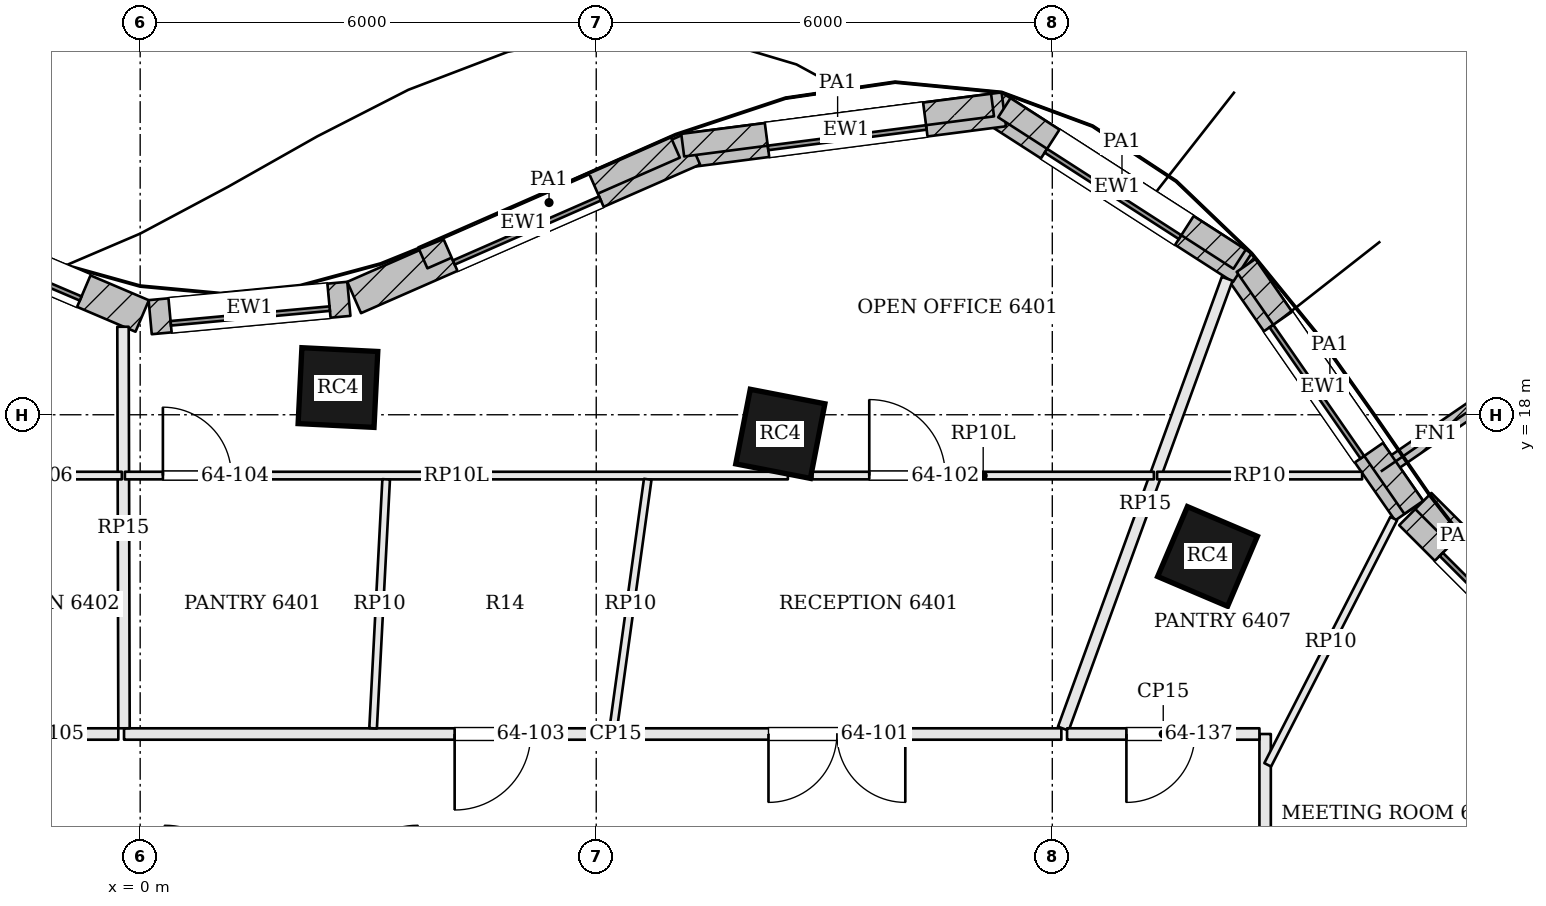
"""IFC4 building model, lengths in metres.
Left out: names, types, materials, properties, quantities, classifications, styles, units other than length and angle.
Written with IfcOpenShell. Run it as: python <this file> out.ifc"""

import sys

from ifc_helpers import new_model, si_unit, direction, frame, frame_2d, origin, origin_2d, place, context, subcontext, project, spatial, rectangle, extrude, element, fill, save


model = new_model("IFC4")
c1 = context("Model", 3, precision=1e-05, world=origin(), true_north=direction((0.0, 1.0)))
c2 = subcontext(c1, "Body", "Model", "MODEL_VIEW")
j1 = project(units=[si_unit("LENGTHUNIT", "METRE"), si_unit("PLANEANGLEUNIT", "RADIAN")], contexts=[c1])
p1 = place(None, origin())
s1 = spatial("IfcSite", under=j1, at=p1, CompositionType="ELEMENT")
p2 = place(p1, origin())
s2 = spatial("IfcBuilding", under=s1, at=p2, CompositionType="ELEMENT")
p3 = place(p2, frame((0.0, 0.0, 260.4)))
s3 = spatial("IfcBuildingStorey", under=s2, at=p3, CompositionType="ELEMENT", Elevation=260.4)
for number, where, z_axis, x_axis in (
    (1, (14.042, 16.136, 0.0), (0.0, 0.0, 1.0), (-0.92, 0.392, 0.0)),
    (2, (8.422, 17.749, 0.0), (0.0, 0.0, 1.0), (-0.982, 0.191, 0.0)),
    (3, (2.602, 18.358, 0.0), (0.0, 0.0, 1.0), (-0.999, 0.05, 0.0)),
):
    element("IfcColumn", number, at=place(p3, frame(where, z_axis=z_axis, x_axis=x_axis)), inside=s3, PredefinedType="COLUMN", context=c2, shape_type="SweptSolid", body=[
        extrude(rectangle(XDim=1.0, YDim=1.0, at=origin_2d()), origin(), (0.0, 0.0, 1.0), 3.1),
    ])
p4 = place(p3, frame((19.145, 14.285, 0.0), z_axis=(0.0, 0.0, 1.0), x_axis=(-0.707427521052, 0.706785895769, 0.0)))
e4 = element("IfcWall", 4, at=p4, inside=s3, PredefinedType="SOLIDWALL", context=c2, shape_type="SweptSolid", body=[
    extrude(rectangle(XDim=3.425, YDim=0.45, at=frame_2d((1.712, 0.0))), origin(), (0.0, 0.0, 1.0), 3.6),
])
p5 = place(p4, frame((0.662, 0.0, 0.9)))
e5 = element("IfcOpeningElement", 5, at=p5, cuts=e4, PredefinedType="OPENING", context=c2, shape_type="SweptSolid", body=[
    extrude(rectangle(XDim=2.1, YDim=1.8, at=frame_2d((1.05, 0.9))), frame((0.0, 0.235, 0.0), z_axis=(0.0, -1.0, 0.0), x_axis=(1.0, 0.0, 0.0)), (0.0, 0.0, 1.0), 0.47),
])
p6 = place(p3, frame((16.695, 16.737, 0.0), z_axis=(0.0, 0.0, 1.0), x_axis=(-0.569652445465, 0.821885692402, 0.0)))
e6 = element("IfcWall", 6, at=p6, inside=s3, PredefinedType="SOLIDWALL", context=c2, shape_type="SweptSolid", body=[
    extrude(rectangle(XDim=3.959, YDim=0.45, at=frame_2d((1.979, 0.0))), origin(), (0.0, 0.0, 1.0), 3.6),
])
p7 = place(p6, frame((0.929, 0.0, 0.9)))
e7 = element("IfcOpeningElement", 7, at=p7, cuts=e6, PredefinedType="OPENING", context=c2, shape_type="SweptSolid", body=[
    extrude(rectangle(XDim=2.1, YDim=1.8, at=frame_2d((1.05, 0.9))), frame((0.0, 0.235, 0.0), z_axis=(0.0, -1.0, 0.0), x_axis=(1.0, 0.0, 0.0)), (0.0, 0.0, 1.0), 0.47),
])
p8 = place(p3, frame((14.499, 19.935, 0.0), z_axis=(0.0, 0.0, 1.0), x_axis=(-0.84080910763, 0.541331732422, 0.0)))
e8 = element("IfcWall", 8, at=p8, inside=s3, PredefinedType="SOLIDWALL", context=c2, shape_type="SweptSolid", body=[
    extrude(rectangle(XDim=3.911, YDim=0.45, at=frame_2d((1.955, 0.0))), origin(), (0.0, 0.0, 1.0), 3.6),
])
p9 = place(p8, frame((0.905, 0.0, 0.9)))
e9 = element("IfcOpeningElement", 9, at=p9, cuts=e8, PredefinedType="OPENING", context=c2, shape_type="SweptSolid", body=[
    extrude(rectangle(XDim=2.1, YDim=1.8, at=frame_2d((1.05, 0.9))), frame((0.0, 0.235, 0.0), z_axis=(0.0, -1.0, 0.0), x_axis=(1.0, 0.0, 0.0)), (0.0, 0.0, 1.0), 0.47),
])
p10 = place(p3, frame((11.362, 22.018, 0.0), z_axis=(0.0, 0.0, 1.0), x_axis=(-0.991724958022, -0.128380713645, 0.0)))
e10 = element("IfcWall", 10, at=p10, inside=s3, PredefinedType="SOLIDWALL", context=c2, shape_type="SweptSolid", body=[
    extrude(rectangle(XDim=4.182, YDim=0.45, at=frame_2d((2.091, 0.0))), origin(), (0.0, 0.0, 1.0), 3.6),
])
p11 = place(p10, frame((1.041, 0.0, 0.9)))
e11 = element("IfcOpeningElement", 11, at=p11, cuts=e10, PredefinedType="OPENING", context=c2, shape_type="SweptSolid", body=[
    extrude(rectangle(XDim=2.1, YDim=1.8, at=frame_2d((1.05, 0.9))), frame((0.0, 0.235, 0.0), z_axis=(0.0, -1.0, 0.0), x_axis=(1.0, 0.0, 0.0)), (0.0, 0.0, 1.0), 0.47),
])
p12 = place(p3, frame((7.276, 21.498, 0.0), z_axis=(0.0, 0.0, 1.0), x_axis=(-0.915872941312, -0.401468249519, 0.0)))
e12 = element("IfcWall", 12, at=p12, inside=s3, PredefinedType="SOLIDWALL", context=c2, shape_type="SweptSolid", body=[
    extrude(rectangle(XDim=4.87, YDim=0.45, at=frame_2d((2.435, 0.0))), origin(), (0.0, 0.0, 1.0), 3.6),
])
p13 = place(p12, frame((1.385, 0.0, 0.9)))
e13 = element("IfcOpeningElement", 13, at=p13, cuts=e12, PredefinedType="OPENING", context=c2, shape_type="SweptSolid", body=[
    extrude(rectangle(XDim=2.1, YDim=1.8, at=frame_2d((1.05, 0.9))), frame((0.0, 0.235, 0.0), z_axis=(0.0, -1.0, 0.0), x_axis=(1.0, 0.0, 0.0)), (0.0, 0.0, 1.0), 0.47),
])
p14 = place(p3, frame((2.745, 19.525, 0.0), z_axis=(0.0, 0.0, 1.0), x_axis=(-0.995768774275, -0.091894222771, 0.0)))
e14 = element("IfcWall", 14, at=p14, inside=s3, PredefinedType="SOLIDWALL", context=c2, shape_type="SweptSolid", body=[
    extrude(rectangle(XDim=2.625, YDim=0.45, at=frame_2d((1.312, 0.0))), origin(), (0.0, 0.0, 1.0), 3.6),
])
p15 = place(p14, frame((0.262, 0.0, 0.9)))
e15 = element("IfcOpeningElement", 15, at=p15, cuts=e14, PredefinedType="OPENING", context=c2, shape_type="SweptSolid", body=[
    extrude(rectangle(XDim=2.1, YDim=1.8, at=frame_2d((1.05, 0.9))), frame((0.0, 0.235, 0.0), z_axis=(0.0, -1.0, 0.0), x_axis=(1.0, 0.0, 0.0)), (0.0, 0.0, 1.0), 0.47),
])
p16 = place(p3, frame((0.026, 19.299, 0.0), z_axis=(0.0, 0.0, 1.0), x_axis=(-0.920040408927, 0.391823488245, 0.0)))
e16 = element("IfcWall", 16, at=p16, inside=s3, PredefinedType="SOLIDWALL", context=c2, shape_type="SweptSolid", body=[
    extrude(rectangle(XDim=3.77, YDim=0.45, at=frame_2d((1.885, 0.0))), origin(), (0.0, 0.0, 1.0), 3.6),
])
p17 = place(p16, frame((0.835, 0.0, 0.9)))
e17 = element("IfcOpeningElement", 17, at=p17, cuts=e16, PredefinedType="OPENING", context=c2, shape_type="SweptSolid", body=[
    extrude(rectangle(XDim=2.1, YDim=1.8, at=frame_2d((1.05, 0.9))), frame((0.0, 0.235, 0.0), z_axis=(0.0, -1.0, 0.0), x_axis=(1.0, 0.0, 0.0)), (0.0, 0.0, 1.0), 0.47),
])
p18 = place(p3, frame((16.322, 17.253, 0.0), z_axis=(0.0, 0.0, 1.0), x_axis=(0.824440606412, 0.565948483962, 0.0)))
e18 = element("IfcWall", 18, at=p18, inside=s3, PredefinedType="SOLIDWALL", context=c2, shape_type="SweptSolid", body=[
    extrude(rectangle(XDim=1.75, YDim=0.2, at=frame_2d((0.875, 0.0))), origin(), (0.0, 0.0, 1.0), 3.6),
])
p19 = place(p3, frame((17.811, 15.936, 3.9), z_axis=(0.0, 0.0, 1.0), x_axis=(-0.707385370732, 0.706828081837, 0.0)))
e19 = element("IfcWall", 19, at=p19, inside=s3, PredefinedType="PARAPET", context=c2, shape_type="SweptSolid", body=[
    extrude(rectangle(XDim=1.314, YDim=0.3, at=frame_2d((0.657, 0.0))), origin(), (0.0, 0.0, 1.0), 1.1),
])
p20 = place(p3, frame((16.755, 16.781, 3.9), z_axis=(0.0, 0.0, 1.0), x_axis=(-0.569678588486, 0.821867571948, 0.0)))
e20 = element("IfcWall", 20, at=p20, inside=s3, PredefinedType="PARAPET", context=c2, shape_type="SweptSolid", body=[
    extrude(rectangle(XDim=3.873, YDim=0.3, at=frame_2d((1.937, 0.0))), origin(), (0.0, 0.0, 1.0), 1.1),
])
p21 = place(p3, frame((14.465, 20.046, 3.9), z_axis=(0.0, 0.0, 1.0), x_axis=(-0.840809836002, 0.541330601095, 0.0)))
e21 = element("IfcWall", 21, at=p21, inside=s3, PredefinedType="PARAPET", context=c2, shape_type="SweptSolid", body=[
    extrude(rectangle(XDim=3.682, YDim=0.3, at=frame_2d((1.841, 0.0))), origin(), (0.0, 0.0, 1.0), 1.1),
])
p22 = place(p3, frame((11.214, 22.074, 3.9), z_axis=(0.0, 0.0, 1.0), x_axis=(-0.991727449614, -0.128361464939, 0.0)))
e22 = element("IfcWall", 22, at=p22, inside=s3, PredefinedType="PARAPET", context=c2, shape_type="SweptSolid", body=[
    extrude(rectangle(XDim=4.11, YDim=0.3, at=frame_2d((2.055, 0.0))), origin(), (0.0, 0.0, 1.0), 1.1),
])
p23 = place(p3, frame((7.039, 21.519, 3.9), z_axis=(0.0, 0.0, 1.0), x_axis=(-0.915895948183, -0.401415759659, 0.0)))
e23 = element("IfcWall", 23, at=p23, inside=s3, PredefinedType="PARAPET", context=c2, shape_type="SweptSolid", body=[
    extrude(rectangle(XDim=3.625, YDim=0.3, at=frame_2d((1.813, 0.0))), origin(), (0.0, 0.0, 1.0), 1.1),
])
p24 = place(p3, frame((12.119, 13.8, 0.0), z_axis=(0.0, 0.0, 1.0), x_axis=(-1.0, 0.0, 0.0)))
e24 = element("IfcWall", 24, at=p24, inside=s3, PredefinedType="PARTITIONING", context=c2, shape_type="SweptSolid", body=[
    extrude(rectangle(XDim=12.332, YDim=0.15, at=frame_2d((6.166, 0.0))), origin(), (0.0, 0.0, 1.0), 2.984),
])
p25 = place(p24, frame((2.053, 0.0, 0.0)))
e25 = element("IfcOpeningElement", 25, at=p25, cuts=e24, PredefinedType="OPENING", context=c2, shape_type="SweptSolid", body=[
    extrude(rectangle(XDim=1.8, YDim=2.1, at=frame_2d((0.9, 1.05))), frame((0.0, 0.085, 0.0), z_axis=(0.0, -1.0, 0.0), x_axis=(1.0, 0.0, 0.0)), (0.0, 0.0, 1.0), 0.17),
])
p26 = place(p24, frame((6.982, 0.0, 0.0)))
e26 = element("IfcOpeningElement", 26, at=p26, cuts=e24, PredefinedType="OPENING", context=c2, shape_type="SweptSolid", body=[
    extrude(rectangle(XDim=1.0, YDim=2.4, at=frame_2d((0.5, 1.2))), frame((0.0, 0.085, 0.0), z_axis=(0.0, -1.0, 0.0), x_axis=(1.0, 0.0, 0.0)), (0.0, 0.0, 1.0), 0.17),
])
p27 = place(p3, frame((14.301, 19.789, 0.0), z_axis=(0.0, 0.0, 1.0), x_axis=(-0.342247171487, -0.939609958232, 0.0)))
e27 = element("IfcWall", 27, at=p27, inside=s3, PredefinedType="PARTITIONING", context=c2, shape_type="SweptSolid", body=[
    extrude(rectangle(XDim=6.299, YDim=0.15, at=frame_2d((3.149, 0.0))), origin(), (0.0, 0.0, 1.0), 2.984),
])
p28 = place(p3, frame((-0.226, 19.158, 0.0), z_axis=(0.0, 0.0, 1.0), x_axis=(0.002541816357, -0.99999676958, 0.0)))
e28 = element("IfcWall", 28, at=p28, inside=s3, PredefinedType="PARTITIONING", context=c2, shape_type="SweptSolid", body=[
    extrude(rectangle(XDim=5.283, YDim=0.15, at=frame_2d((2.641, 0.0))), origin(), (0.0, 0.0, 1.0), 2.984),
])
p29 = place(p3, frame((-0.288, 13.8, 0.0), z_axis=(0.0, 0.0, 1.0), x_axis=(-1.0, 0.0, 0.0)))
e29 = element("IfcWall", 29, at=p29, inside=s3, PredefinedType="PARTITIONING", context=c2, shape_type="SweptSolid", body=[
    extrude(rectangle(XDim=11.549, YDim=0.15, at=frame_2d((5.775, 0.0))), origin(), (0.0, 0.0, 1.0), 2.984),
])
p30 = place(p29, frame((0.899, 0.0, 0.0)))
e30 = element("IfcOpeningElement", 30, at=p30, cuts=e29, PredefinedType="OPENING", context=c2, shape_type="SweptSolid", body=[
    extrude(rectangle(XDim=1.0, YDim=2.1, at=frame_2d((0.5, 1.05))), frame((0.0, 0.085, 0.0), z_axis=(0.0, -1.0, 0.0), x_axis=(1.0, 0.0, 0.0)), (0.0, 0.0, 1.0), 0.17),
])
p31 = place(p29, frame((3.915, 0.0, 0.0)))
e31 = element("IfcOpeningElement", 31, at=p31, cuts=e29, PredefinedType="OPENING", context=c2, shape_type="SweptSolid", body=[
    extrude(rectangle(XDim=1.0, YDim=2.4, at=frame_2d((0.5, 1.2))), frame((0.0, 0.085, 0.0), z_axis=(0.0, -1.0, 0.0), x_axis=(1.0, 0.0, 0.0)), (0.0, 0.0, 1.0), 0.17),
])
p32 = place(p3, frame((14.8, 2.318, 0.0), z_axis=(0.0, 0.0, 1.0), x_axis=(0.0, 1.0, 0.0)))
e32 = element("IfcWall", 32, at=p32, inside=s3, PredefinedType="PARTITIONING", context=c2, shape_type="SweptSolid", body=[
    extrude(rectangle(XDim=11.482, YDim=0.15, at=frame_2d((5.741, 0.0))), origin(), (0.0, 0.0, 1.0), 2.984),
])
p33 = place(p32, frame((1.806, 0.0, 0.0)))
e33 = element("IfcOpeningElement", 33, at=p33, cuts=e32, PredefinedType="OPENING", context=c2, shape_type="SweptSolid", body=[
    extrude(rectangle(XDim=1.8, YDim=2.1, at=frame_2d((0.9, 1.05))), frame((0.0, 0.085, 0.0), z_axis=(0.0, -1.0, 0.0), x_axis=(1.0, 0.0, 0.0)), (0.0, 0.0, 1.0), 0.17),
])
p34 = place(p32, frame((7.748, 0.0, 0.0)))
e34 = element("IfcOpeningElement", 34, at=p34, cuts=e32, PredefinedType="OPENING", context=c2, shape_type="SweptSolid", body=[
    extrude(rectangle(XDim=1.0, YDim=2.4, at=frame_2d((0.5, 1.2))), frame((0.0, 0.085, 0.0), z_axis=(0.0, -1.0, 0.0), x_axis=(1.0, 0.0, 0.0)), (0.0, 0.0, 1.0), 0.17),
])
p35 = place(p3, frame((14.725, 13.8, 0.0), z_axis=(0.0, 0.0, 1.0), x_axis=(-1.0, 0.0, 0.0)))
e35 = element("IfcWall", 35, at=p35, inside=s3, PredefinedType="PARTITIONING", context=c2, shape_type="SweptSolid", body=[
    extrude(rectangle(XDim=2.531, YDim=0.15, at=frame_2d((1.266, 0.0))), origin(), (0.0, 0.0, 1.0), 2.984),
])
p36 = place(p35, frame((0.85, 0.0, 0.0)))
e36 = element("IfcOpeningElement", 36, at=p36, cuts=e35, PredefinedType="OPENING", context=c2, shape_type="SweptSolid", body=[
    extrude(rectangle(XDim=0.9, YDim=2.1, at=frame_2d((0.45, 1.05))), frame((0.0, 0.085, 0.0), z_axis=(0.0, -1.0, 0.0), x_axis=(1.0, 0.0, 0.0)), (0.0, 0.0, 1.0), 0.17),
])
p37 = place(p3, frame((-0.201, 17.2, 0.0), z_axis=(0.0, 0.0, 1.0), x_axis=(1.0, 0.0, 0.0)))
e37 = element("IfcWall", 37, at=p37, inside=s3, PredefinedType="PARTITIONING", context=c2, shape_type="SweptSolid", body=[
    extrude(rectangle(XDim=8.722, YDim=0.1, at=frame_2d((4.361, 0.0))), origin(), (0.0, 0.0, 1.0), 2.58),
])
p38 = place(p37, frame((0.5, 0.0, 0.0)))
e38 = element("IfcOpeningElement", 38, at=p38, cuts=e37, PredefinedType="OPENING", context=c2, shape_type="SweptSolid", body=[
    extrude(rectangle(XDim=0.9, YDim=2.1, at=frame_2d((0.45, 1.05))), frame((0.0, 0.06, 0.0), z_axis=(0.0, -1.0, 0.0), x_axis=(1.0, 0.0, 0.0)), (0.0, 0.0, 1.0), 0.12),
])
p39 = place(p3, frame((8.845, 17.2, 0.0), z_axis=(0.0, 0.0, 1.0), x_axis=(1.0, 0.0, 0.0)))
e39 = element("IfcWall", 39, at=p39, inside=s3, PredefinedType="PARTITIONING", context=c2, shape_type="SweptSolid", body=[
    extrude(rectangle(XDim=4.491, YDim=0.1, at=frame_2d((2.246, 0.0))), origin(), (0.0, 0.0, 1.0), 2.58),
])
p40 = place(p39, frame((0.747, 0.0, 0.0)))
e40 = element("IfcOpeningElement", 40, at=p40, cuts=e39, PredefinedType="OPENING", context=c2, shape_type="SweptSolid", body=[
    extrude(rectangle(XDim=1.0, YDim=2.1, at=frame_2d((0.5, 1.05))), frame((0.0, 0.06, 0.0), z_axis=(0.0, -1.0, 0.0), x_axis=(1.0, 0.0, 0.0)), (0.0, 0.0, 1.0), 0.12),
])
p41 = place(p3, frame((6.224, 13.874, 0.0), z_axis=(0.0, 0.0, 1.0), x_axis=(0.13700708293, 0.990570067803, 0.0)))
e41 = element("IfcWall", 41, at=p41, inside=s3, PredefinedType="PARTITIONING", context=c2, shape_type="SweptSolid", body=[
    extrude(rectangle(XDim=3.307, YDim=0.1, at=frame_2d((1.654, 0.0))), origin(), (0.0, 0.0, 1.0), 2.984),
])
p42 = place(p3, frame((3.064, 13.875, 0.0), z_axis=(0.0, 0.0, 1.0), x_axis=(0.05240645469, 0.998625837592, 0.0)))
e42 = element("IfcWall", 42, at=p42, inside=s3, PredefinedType="PARTITIONING", context=c2, shape_type="SweptSolid", body=[
    extrude(rectangle(XDim=3.28, YDim=0.1, at=frame_2d((1.64, 0.0))), origin(), (0.0, 0.0, 1.0), 2.984),
])
p43 = place(p3, frame((-8.566, 17.2, 0.0), z_axis=(0.0, 0.0, 1.0), x_axis=(1.0, 0.0, 0.0)))
e43 = element("IfcWall", 43, at=p43, inside=s3, PredefinedType="PARTITIONING", context=c2, shape_type="SweptSolid", body=[
    extrude(rectangle(XDim=8.325, YDim=0.1, at=frame_2d((4.162, 0.0))), origin(), (0.0, 0.0, 1.0), 2.58),
])
p44 = place(p43, frame((6.23, 0.0, 0.0)))
e44 = element("IfcOpeningElement", 44, at=p44, cuts=e43, PredefinedType="OPENING", context=c2, shape_type="SweptSolid", body=[
    extrude(rectangle(XDim=1.0, YDim=2.1, at=frame_2d((0.5, 1.05))), frame((0.0, 0.06, 0.0), z_axis=(0.0, -1.0, 0.0), x_axis=(1.0, 0.0, 0.0)), (0.0, 0.0, 1.0), 0.12),
])
p45 = place(p43, frame((0.475, 0.0, 0.0)))
e45 = element("IfcOpeningElement", 45, at=p45, cuts=e43, PredefinedType="OPENING", context=c2, shape_type="SweptSolid", body=[
    extrude(rectangle(XDim=0.9, YDim=2.1, at=frame_2d((0.45, 1.05))), frame((0.0, 0.06, 0.0), z_axis=(0.0, -1.0, 0.0), x_axis=(1.0, 0.0, 0.0)), (0.0, 0.0, 1.0), 0.12),
])
p46 = place(p3, frame((13.379, 17.2, 0.0), z_axis=(0.0, 0.0, 1.0), x_axis=(1.0, 0.0, 0.0)))
e46 = element("IfcWall", 46, at=p46, inside=s3, PredefinedType="PARTITIONING", context=c2, shape_type="SweptSolid", body=[
    extrude(rectangle(XDim=2.697, YDim=0.1, at=frame_2d((1.349, 0.0))), origin(), (0.0, 0.0, 1.0), 2.984),
])
p47 = place(p3, frame((14.834, 13.394, 0.0), z_axis=(0.0, 0.0, 1.0), x_axis=(0.455511656282, 0.890229819199, 0.0)))
e47 = element("IfcWall", 47, at=p47, inside=s3, PredefinedType="PARTITIONING", context=c2, shape_type="SweptSolid", body=[
    extrude(rectangle(XDim=3.64, YDim=0.1, at=frame_2d((1.82, 0.0))), origin(), (0.0, 0.0, 1.0), 2.984),
])
p48 = place(p5, origin())
e48 = element("IfcWindow", 48, at=p48, inside=s3, PartitioningType="SINGLE_PANEL", PredefinedType="WINDOW", context=c2, shape_type="SweptSolid", body=[
    extrude(rectangle(XDim=2.1, YDim=1.8, at=frame_2d((1.05, 0.9))), frame((0.0, 0.135, 0.0), z_axis=(0.0, -1.0, 0.0), x_axis=(1.0, 0.0, 0.0)), (0.0, 0.0, 1.0), 0.06),
])
fill(e5, e48)
p49 = place(p7, origin())
e49 = element("IfcWindow", 49, at=p49, inside=s3, PartitioningType="SINGLE_PANEL", PredefinedType="WINDOW", context=c2, shape_type="SweptSolid", body=[
    extrude(rectangle(XDim=2.1, YDim=1.8, at=frame_2d((1.05, 0.9))), frame((0.0, 0.135, 0.0), z_axis=(0.0, -1.0, 0.0), x_axis=(1.0, 0.0, 0.0)), (0.0, 0.0, 1.0), 0.06),
])
fill(e7, e49)
p50 = place(p9, origin())
e50 = element("IfcWindow", 50, at=p50, inside=s3, PartitioningType="SINGLE_PANEL", PredefinedType="WINDOW", context=c2, shape_type="SweptSolid", body=[
    extrude(rectangle(XDim=2.1, YDim=1.8, at=frame_2d((1.05, 0.9))), frame((0.0, 0.135, 0.0), z_axis=(0.0, -1.0, 0.0), x_axis=(1.0, 0.0, 0.0)), (0.0, 0.0, 1.0), 0.06),
])
fill(e9, e50)
p51 = place(p11, origin())
e51 = element("IfcWindow", 51, at=p51, inside=s3, PartitioningType="SINGLE_PANEL", PredefinedType="WINDOW", context=c2, shape_type="SweptSolid", body=[
    extrude(rectangle(XDim=2.1, YDim=1.8, at=frame_2d((1.05, 0.9))), frame((0.0, 0.135, 0.0), z_axis=(0.0, -1.0, 0.0), x_axis=(1.0, 0.0, 0.0)), (0.0, 0.0, 1.0), 0.06),
])
fill(e11, e51)
p52 = place(p13, origin())
e52 = element("IfcWindow", 52, at=p52, inside=s3, PartitioningType="SINGLE_PANEL", PredefinedType="WINDOW", context=c2, shape_type="SweptSolid", body=[
    extrude(rectangle(XDim=2.1, YDim=1.8, at=frame_2d((1.05, 0.9))), frame((0.0, 0.135, 0.0), z_axis=(0.0, -1.0, 0.0), x_axis=(1.0, 0.0, 0.0)), (0.0, 0.0, 1.0), 0.06),
])
fill(e13, e52)
p53 = place(p15, origin())
e53 = element("IfcWindow", 53, at=p53, inside=s3, PartitioningType="SINGLE_PANEL", PredefinedType="WINDOW", context=c2, shape_type="SweptSolid", body=[
    extrude(rectangle(XDim=2.1, YDim=1.8, at=frame_2d((1.05, 0.9))), frame((0.0, 0.135, 0.0), z_axis=(0.0, -1.0, 0.0), x_axis=(1.0, 0.0, 0.0)), (0.0, 0.0, 1.0), 0.06),
])
fill(e15, e53)
p54 = place(p17, origin())
e54 = element("IfcWindow", 54, at=p54, inside=s3, PartitioningType="SINGLE_PANEL", PredefinedType="WINDOW", context=c2, shape_type="SweptSolid", body=[
    extrude(rectangle(XDim=2.1, YDim=1.8, at=frame_2d((1.05, 0.9))), frame((0.0, 0.135, 0.0), z_axis=(0.0, -1.0, 0.0), x_axis=(1.0, 0.0, 0.0)), (0.0, 0.0, 1.0), 0.06),
])
fill(e17, e54)
p55 = place(p25, origin())
e55 = element("IfcDoor", 55, at=p55, inside=s3, OperationType="DOUBLE_DOOR_SINGLE_SWING", PredefinedType="DOOR", context=c2, shape_type="SweptSolid", body=[
    extrude(rectangle(XDim=1.8, YDim=2.1, at=frame_2d((0.9, 1.05))), frame((0.0, 0.025, 0.0), z_axis=(0.0, -1.0, 0.0), x_axis=(1.0, 0.0, 0.0)), (0.0, 0.0, 1.0), 0.05),
])
fill(e25, e55)
p56 = place(p40, origin())
e56 = element("IfcDoor", 56, at=p56, inside=s3, OperationType="SINGLE_SWING_LEFT", PredefinedType="DOOR", context=c2, shape_type="SweptSolid", body=[
    extrude(rectangle(XDim=1.0, YDim=2.1, at=frame_2d((0.5, 1.05))), frame((0.0, 0.025, 0.0), z_axis=(0.0, -1.0, 0.0), x_axis=(1.0, 0.0, 0.0)), (0.0, 0.0, 1.0), 0.05),
])
fill(e40, e56)
p57 = place(p26, origin())
e57 = element("IfcDoor", 57, at=p57, inside=s3, OperationType="SINGLE_SWING_RIGHT", PredefinedType="DOOR", context=c2, shape_type="SweptSolid", body=[
    extrude(rectangle(XDim=1.0, YDim=2.4, at=frame_2d((0.5, 1.2))), frame((0.0, 0.025, 0.0), z_axis=(0.0, -1.0, 0.0), x_axis=(1.0, 0.0, 0.0)), (0.0, 0.0, 1.0), 0.05),
])
fill(e26, e57)
p58 = place(p38, origin())
e58 = element("IfcDoor", 58, at=p58, inside=s3, OperationType="SINGLE_SWING_LEFT", PredefinedType="DOOR", context=c2, shape_type="SweptSolid", body=[
    extrude(rectangle(XDim=0.9, YDim=2.1, at=frame_2d((0.45, 1.05))), frame((0.0, 0.025, 0.0), z_axis=(0.0, -1.0, 0.0), x_axis=(1.0, 0.0, 0.0)), (0.0, 0.0, 1.0), 0.05),
])
fill(e38, e58)
p59 = place(p36, origin())
e59 = element("IfcDoor", 59, at=p59, inside=s3, OperationType="SINGLE_SWING_RIGHT", PredefinedType="DOOR", context=c2, shape_type="SweptSolid", body=[
    extrude(rectangle(XDim=0.9, YDim=2.1, at=frame_2d((0.45, 1.05))), frame((0.0, 0.025, 0.0), z_axis=(0.0, -1.0, 0.0), x_axis=(1.0, 0.0, 0.0)), (0.0, 0.0, 1.0), 0.05),
])
fill(e36, e59)
save(model, sys.argv[1])
